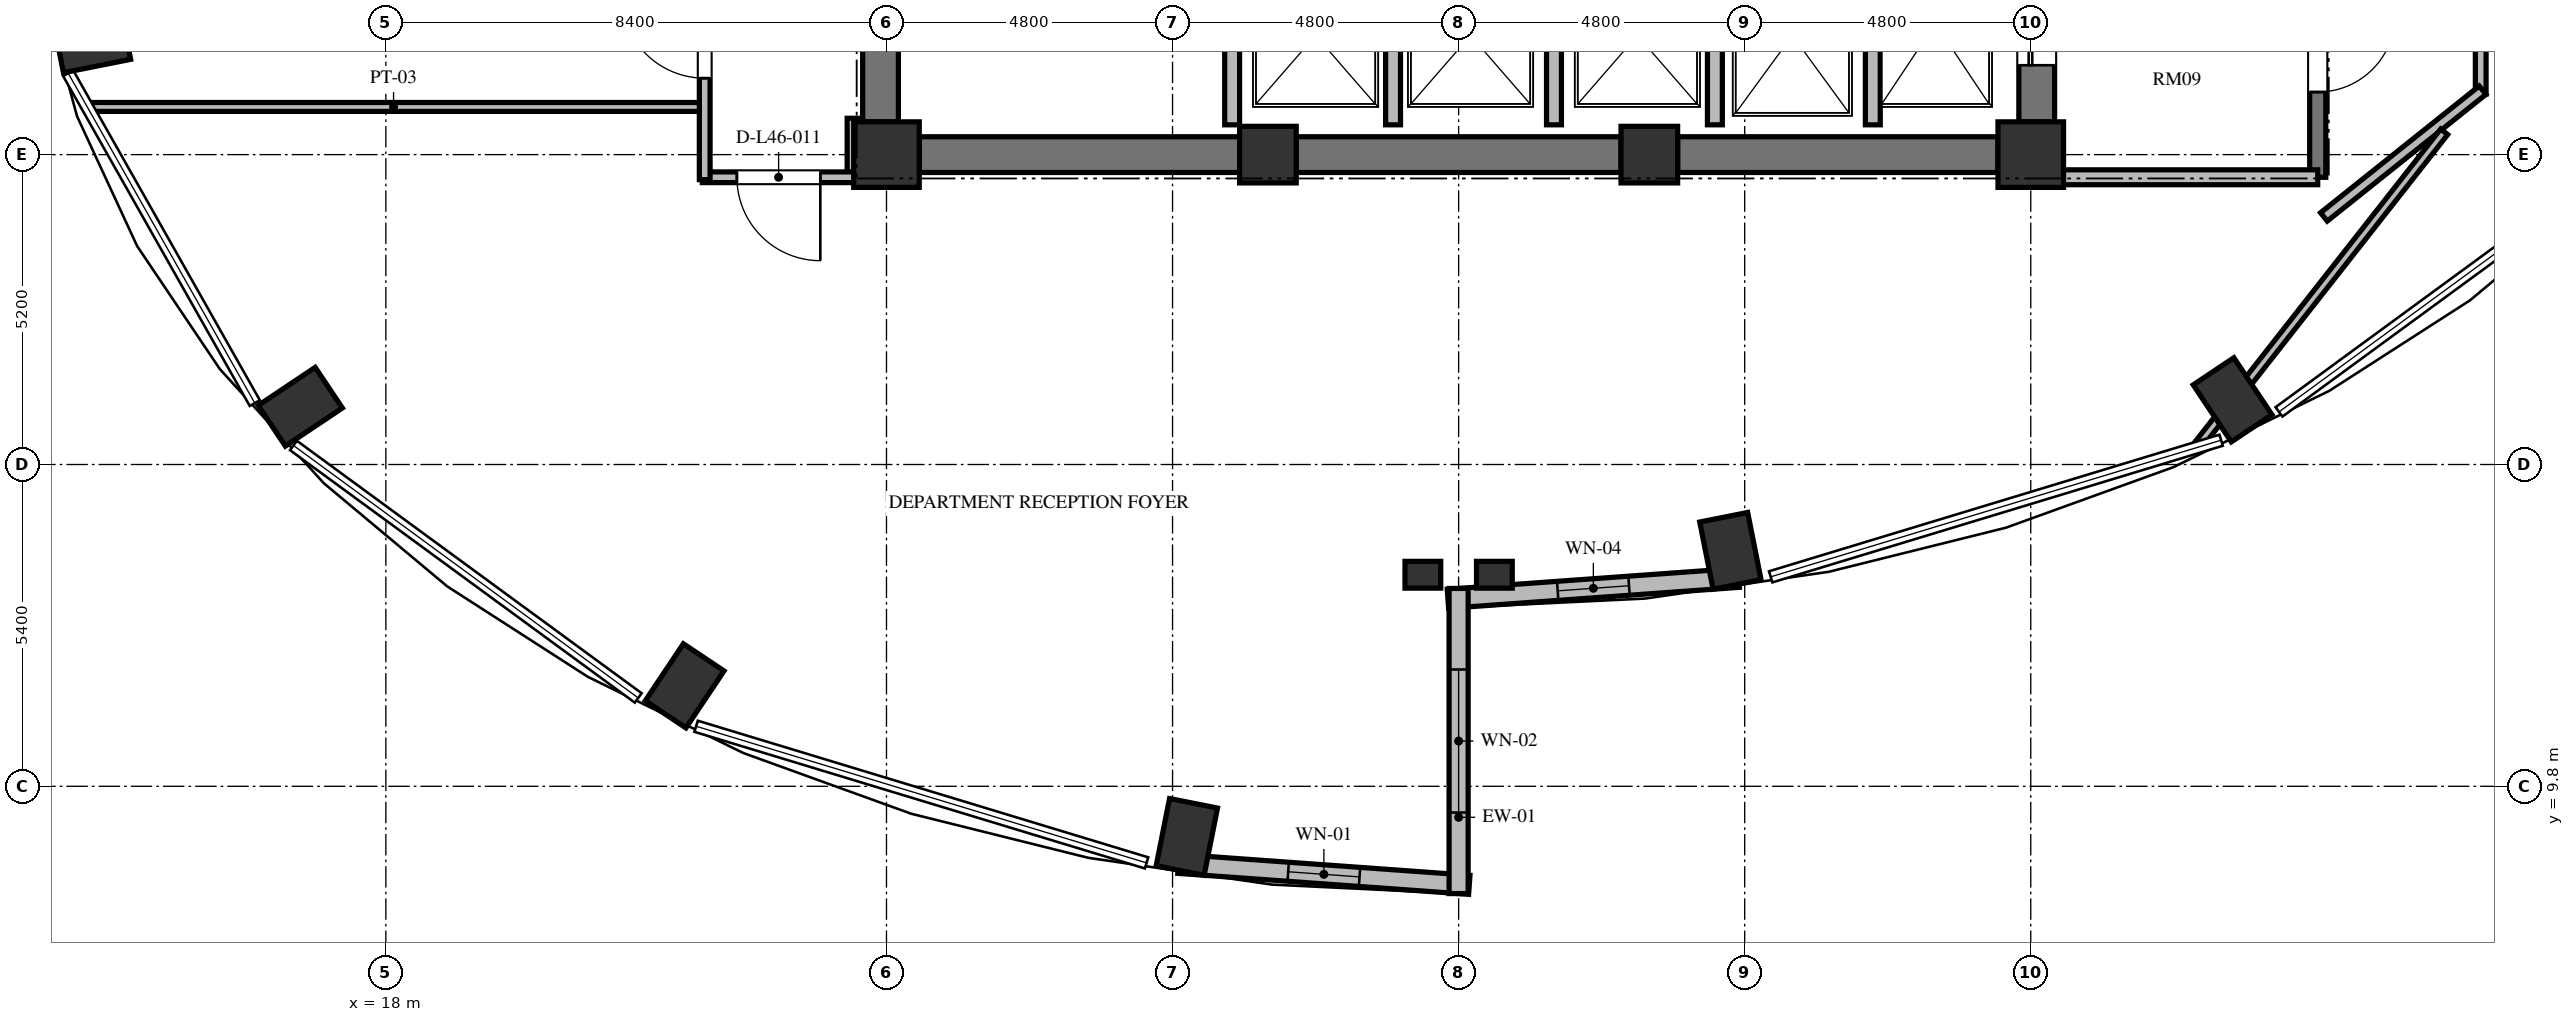
"""IFC4 building model, lengths in metres.
Left out: names, types, materials, properties, quantities, classifications, styles, units other than length and angle.
Written with IfcOpenShell. Run it as: python <this file> out.ifc"""

import sys

from ifc_helpers import new_model, si_unit, direction, frame, frame_2d, origin, origin_2d, place, context, subcontext, project, spatial, rectangle, extrude, element, fill, save


model = new_model("IFC4")
c1 = context("Model", 3, precision=1e-05, world=origin(), true_north=direction((0.0, 1.0)))
c2 = subcontext(c1, "Body", "Model", "MODEL_VIEW")
j1 = project(units=[si_unit("LENGTHUNIT", "METRE"), si_unit("PLANEANGLEUNIT", "RADIAN")], contexts=[c1])
p1 = place(None, origin())
s1 = spatial("IfcSite", under=j1, at=p1, CompositionType="ELEMENT")
p2 = place(p1, origin())
s2 = spatial("IfcBuilding", under=s1, at=p2, CompositionType="ELEMENT")
p3 = place(p2, frame((0.0, 0.0, 178.416)))
s3 = spatial("IfcBuildingStorey", under=s2, at=p3, CompositionType="ELEMENT", Elevation=178.416)
for number, where, z_axis, x_axis in (
    (1, (40.56, 13.751, 0.0), (0.0, 0.0, 1.0), (0.195, -0.981, 0.0)),
    (2, (48.987, 16.286, 0.0), (0.0, 0.0, 1.0), (0.556, -0.831, 0.0)),
    (3, (13.074, 22.288, 0.0), (0.0, 0.0, 1.0), (-0.981, -0.195, 0.0)),
    (4, (16.564, 16.169, 0.0), (0.0, 0.0, 1.0), (-0.831, -0.556, 0.0)),
    (5, (23.013, 11.486, 0.0), (0.0, 0.0, 1.0), (-0.556, -0.831, 0.0)),
    (6, (31.44, 8.951, 0.0), (0.0, 0.0, 1.0), (-0.195, -0.981, 0.0)),
):
    element("IfcColumn", number, at=place(p3, frame(where, z_axis=z_axis, x_axis=x_axis)), inside=s3, PredefinedType="COLUMN", context=c2, shape_type="SweptSolid", body=[
        extrude(rectangle(XDim=1.15, YDim=0.82, at=origin_2d()), origin(), (0.0, 0.0, 1.0), 3.648),
    ])
p4 = place(p3, frame((26.4, 20.4, 0.0), z_axis=(0.0, 0.0, 1.0), x_axis=(1.0, 0.0, 0.0)))
e7 = element("IfcColumn", 7, at=p4, inside=s3, PredefinedType="COLUMN", context=c2, shape_type="SweptSolid", body=[
    extrude(rectangle(XDim=1.1, YDim=1.1, at=origin_2d()), origin(), (0.0, 0.0, 1.0), 3.648),
])
for number, where, z_axis, x_axis in (
    (8, (32.8, 20.4, 0.0), (0.0, 0.0, 1.0), (1.0, 0.0, 0.0)),
    (9, (39.2, 20.4, 0.0), (0.0, 0.0, 1.0), (1.0, 0.0, 0.0)),
):
    element("IfcColumn", number, at=place(p3, frame(where, z_axis=z_axis, x_axis=x_axis)), inside=s3, PredefinedType="COLUMN", context=c2, shape_type="SweptSolid", body=[
        extrude(rectangle(XDim=0.95, YDim=0.95, at=origin_2d()), origin(), (0.0, 0.0, 1.0), 3.648),
    ])
p5 = place(p3, frame((45.6, 20.4, 0.0), z_axis=(0.0, 0.0, 1.0), x_axis=(1.0, 0.0, 0.0)))
e10 = element("IfcColumn", 10, at=p5, inside=s3, PredefinedType="COLUMN", context=c2, shape_type="SweptSolid", body=[
    extrude(rectangle(XDim=1.1, YDim=1.1, at=origin_2d()), origin(), (0.0, 0.0, 1.0), 3.648),
])
for number, where, z_axis, x_axis in (
    (11, (35.4, 13.35, 0.0), (0.0, 0.0, 1.0), (1.0, 0.0, 0.0)),
    (12, (36.6, 13.35, 0.0), (0.0, 0.0, 1.0), (1.0, 0.0, 0.0)),
):
    element("IfcColumn", number, at=place(p3, frame(where, z_axis=z_axis, x_axis=x_axis)), inside=s3, PredefinedType="PILASTER", context=c2, shape_type="SweptSolid", body=[
        extrude(rectangle(XDim=0.6, YDim=0.45, at=origin_2d()), origin(), (0.0, 0.0, 1.0), 3.648),
    ])
p6 = place(p3, frame((26.3, 20.95, 0.0), z_axis=(0.0, 0.0, 1.0), x_axis=(0.0, 1.0, 0.0)))
e13 = element("IfcWall", 13, at=p6, inside=s3, PredefinedType="SHEAR", context=c2, shape_type="SweptSolid", body=[
    extrude(rectangle(XDim=14.1, YDim=0.6, at=frame_2d((7.05, 0.0))), origin(), (0.0, 0.0, 1.0), 3.648),
])
p7 = place(p6, frame((6.5, 0.0, 0.0)))
e14 = element("IfcOpeningElement", 14, at=p7, cuts=e13, PredefinedType="OPENING", context=c2, shape_type="SweptSolid", body=[
    extrude(rectangle(XDim=1.2, YDim=2.15, at=frame_2d((0.6, 1.075))), frame((0.0, 0.31, 0.0), z_axis=(0.0, -1.0, 0.0), x_axis=(1.0, 0.0, 0.0)), (0.0, 0.0, 1.0), 0.62),
])
p8 = place(p6, frame((9.6, 0.0, 0.0)))
e15 = element("IfcOpeningElement", 15, at=p8, cuts=e13, PredefinedType="OPENING", context=c2, shape_type="SweptSolid", body=[
    extrude(rectangle(XDim=1.3, YDim=2.2, at=frame_2d((0.65, 1.1))), frame((0.0, 0.31, 0.0), z_axis=(0.0, -1.0, 0.0), x_axis=(1.0, 0.0, 0.0)), (0.0, 0.0, 1.0), 0.62),
])
p9 = place(p6, frame((3.26, 0.0, 0.0)))
e16 = element("IfcOpeningElement", 16, at=p9, cuts=e13, PredefinedType="OPENING", context=c2, shape_type="SweptSolid", body=[
    extrude(rectangle(XDim=1.3, YDim=2.2, at=frame_2d((0.65, 1.1))), frame((0.0, 0.31, 0.0), z_axis=(0.0, -1.0, 0.0), x_axis=(1.0, 0.0, 0.0)), (0.0, 0.0, 1.0), 0.62),
])
p10 = place(p3, frame((45.7, 20.95, 0.0), z_axis=(0.0, 0.0, 1.0), x_axis=(0.0, 1.0, 0.0)))
e17 = element("IfcWall", 17, at=p10, inside=s3, PredefinedType="SHEAR", context=c2, shape_type="SweptSolid", body=[
    extrude(rectangle(XDim=14.1, YDim=0.6, at=frame_2d((7.05, 0.0))), origin(), (0.0, 0.0, 1.0), 3.648),
])
p11 = place(p10, frame((11.75, 0.0, 0.0)))
e18 = element("IfcOpeningElement", 18, at=p11, cuts=e17, PredefinedType="OPENING", context=c2, shape_type="SweptSolid", body=[
    extrude(rectangle(XDim=1.4, YDim=2.3, at=frame_2d((0.7, 1.15))), frame((0.0, 0.31, 0.0), z_axis=(0.0, -1.0, 0.0), x_axis=(1.0, 0.0, 0.0)), (0.0, 0.0, 1.0), 0.62),
])
p12 = place(p10, frame((0.95, 0.0, 0.0)))
e19 = element("IfcOpeningElement", 19, at=p12, cuts=e17, PredefinedType="OPENING", context=c2, shape_type="SweptSolid", body=[
    extrude(rectangle(XDim=1.4, YDim=2.3, at=frame_2d((0.7, 1.15))), frame((0.0, 0.31, 0.0), z_axis=(0.0, -1.0, 0.0), x_axis=(1.0, 0.0, 0.0)), (0.0, 0.0, 1.0), 0.62),
])
p13 = place(p3, frame((26.95, 20.4, 0.0), z_axis=(0.0, 0.0, 1.0), x_axis=(1.0, 0.0, 0.0)))
e20 = element("IfcWall", 20, at=p13, inside=s3, PredefinedType="SHEAR", context=c2, shape_type="SweptSolid", body=[
    extrude(rectangle(XDim=5.375, YDim=0.6, at=frame_2d((2.688, 0.0))), origin(), (0.0, 0.0, 1.0), 3.648),
])
p14 = place(p3, frame((33.275, 20.4, 0.0), z_axis=(0.0, 0.0, 1.0), x_axis=(1.0, 0.0, 0.0)))
e21 = element("IfcWall", 21, at=p14, inside=s3, PredefinedType="SHEAR", context=c2, shape_type="SweptSolid", body=[
    extrude(rectangle(XDim=5.45, YDim=0.6, at=frame_2d((2.725, 0.0))), origin(), (0.0, 0.0, 1.0), 3.648),
])
p15 = place(p3, frame((39.675, 20.4, 0.0), z_axis=(0.0, 0.0, 1.0), x_axis=(1.0, 0.0, 0.0)))
e22 = element("IfcWall", 22, at=p15, inside=s3, PredefinedType="SHEAR", context=c2, shape_type="SweptSolid", body=[
    extrude(rectangle(XDim=5.375, YDim=0.6, at=frame_2d((2.688, 0.0))), origin(), (0.0, 0.0, 1.0), 3.648),
])
p16 = place(p3, frame((35.821, 12.947, 0.0), z_axis=(0.0, 0.0, 1.0), x_axis=(0.997415460462, 0.071849838072, 0.0)))
e23 = element("IfcWall", 23, at=p16, inside=s3, PredefinedType="SOLIDWALL", context=c2, shape_type="SweptSolid", body=[
    extrude(rectangle(XDim=4.893, YDim=0.32, at=frame_2d((2.447, 0.0))), origin(), (0.0, 0.0, 1.0), 3.428),
])
p17 = place(p16, frame((1.846, 0.0, 0.85)))
e24 = element("IfcOpeningElement", 24, at=p17, cuts=e23, PredefinedType="OPENING", context=c2, shape_type="SweptSolid", body=[
    extrude(rectangle(XDim=1.2, YDim=1.8, at=frame_2d((0.6, 0.9))), frame((0.0, 0.17, 0.0), z_axis=(0.0, -1.0, 0.0), x_axis=(1.0, 0.0, 0.0)), (0.0, 0.0, 1.0), 0.34),
])
p18 = place(p3, frame((31.299, 8.499, 0.0), z_axis=(0.0, 0.0, 1.0), x_axis=(0.997415202861, -0.071853413984, 0.0)))
e25 = element("IfcWall", 25, at=p18, inside=s3, PredefinedType="SOLIDWALL", context=c2, shape_type="SweptSolid", body=[
    extrude(rectangle(XDim=4.893, YDim=0.32, at=frame_2d((2.446, 0.0))), origin(), (0.0, 0.0, 1.0), 3.428),
])
p19 = place(p18, frame((1.846, 0.0, 0.85)))
e26 = element("IfcOpeningElement", 26, at=p19, cuts=e25, PredefinedType="OPENING", context=c2, shape_type="SweptSolid", body=[
    extrude(rectangle(XDim=1.2, YDim=2.2, at=frame_2d((0.6, 1.1))), frame((0.0, 0.17, 0.0), z_axis=(0.0, -1.0, 0.0), x_axis=(1.0, 0.0, 0.0)), (0.0, 0.0, 1.0), 0.34),
])
p20 = place(p3, frame((36.0, 8.0, 0.0), z_axis=(0.0, 0.0, 1.0), x_axis=(0.0, 1.0, 0.0)))
e27 = element("IfcWall", 27, at=p20, inside=s3, PredefinedType="SOLIDWALL", context=c2, shape_type="SweptSolid", body=[
    extrude(rectangle(XDim=5.12, YDim=0.32, at=frame_2d((2.56, 0.0))), origin(), (0.0, 0.0, 1.0), 3.428),
])
p21 = place(p20, frame((1.36, 0.0, 0.84)))
e28 = element("IfcOpeningElement", 28, at=p21, cuts=e27, PredefinedType="OPENING", context=c2, shape_type="SweptSolid", body=[
    extrude(rectangle(XDim=2.4, YDim=2.04, at=frame_2d((1.2, 1.02))), frame((0.0, 0.17, 0.0), z_axis=(0.0, -1.0, 0.0), x_axis=(1.0, 0.0, 0.0)), (0.0, 0.0, 1.0), 0.34),
])
p22 = place(p3, frame((42.95, 20.9, 0.0), z_axis=(0.0, 0.0, 1.0), x_axis=(0.0, 1.0, 0.0)))
e29 = element("IfcWall", 29, at=p22, inside=s3, PredefinedType="SOLIDWALL", context=c2, shape_type="SweptSolid", body=[
    extrude(rectangle(XDim=3.2, YDim=0.25, at=frame_2d((1.6, 0.0))), origin(), (0.0, 0.0, 1.0), 3.428),
])
for number, where, z_axis, x_axis in (
    (30, (32.2, 20.9, 0.0), (0.0, 0.0, 1.0), (0.0, 1.0, 0.0)),
    (31, (34.9, 20.9, 0.0), (0.0, 0.0, 1.0), (0.0, 1.0, 0.0)),
    (32, (37.6, 20.9, 0.0), (0.0, 0.0, 1.0), (0.0, 1.0, 0.0)),
    (33, (40.3, 20.9, 0.0), (0.0, 0.0, 1.0), (0.0, 1.0, 0.0)),
):
    element("IfcWall", number, at=place(p3, frame(where, z_axis=z_axis, x_axis=x_axis)), inside=s3, PredefinedType="SOLIDWALL", context=c2, shape_type="SweptSolid", body=[
        extrude(rectangle(XDim=2.8, YDim=0.25, at=frame_2d((1.4, 0.0))), origin(), (0.0, 0.0, 1.0), 3.428),
    ])
p23 = place(p3, frame((50.415, 35.845, 0.0), z_axis=(0.0, 0.0, 1.0), x_axis=(0.0, -1.0, 0.0)))
e34 = element("IfcWall", 34, at=p23, inside=s3, PredefinedType="SHEAR", context=c2, shape_type="SweptSolid", body=[
    extrude(rectangle(XDim=15.825, YDim=0.27, at=frame_2d((7.913, 0.0))), origin(), (0.0, 0.0, 1.0), 3.648),
])
p24 = place(p23, frame((4.445, 0.0, 0.0)))
e35 = element("IfcOpeningElement", 35, at=p24, cuts=e34, PredefinedType="OPENING", context=c2, shape_type="SweptSolid", body=[
    extrude(rectangle(XDim=1.2, YDim=2.15, at=frame_2d((0.6, 1.075))), frame((0.0, 0.145, 0.0), z_axis=(0.0, -1.0, 0.0), x_axis=(1.0, 0.0, 0.0)), (0.0, 0.0, 1.0), 0.29),
])
p25 = place(p23, frame((1.295, 0.0, 0.0)))
e36 = element("IfcOpeningElement", 36, at=p25, cuts=e34, PredefinedType="OPENING", context=c2, shape_type="SweptSolid", body=[
    extrude(rectangle(XDim=1.3, YDim=2.2, at=frame_2d((0.65, 1.1))), frame((0.0, 0.145, 0.0), z_axis=(0.0, -1.0, 0.0), x_axis=(1.0, 0.0, 0.0)), (0.0, 0.0, 1.0), 0.29),
])
p26 = place(p23, frame((13.095, 0.0, 0.0)))
e37 = element("IfcOpeningElement", 37, at=p26, cuts=e34, PredefinedType="OPENING", context=c2, shape_type="SweptSolid", body=[
    extrude(rectangle(XDim=1.3, YDim=2.2, at=frame_2d((0.65, 1.1))), frame((0.0, 0.145, 0.0), z_axis=(0.0, -1.0, 0.0), x_axis=(1.0, 0.0, 0.0)), (0.0, 0.0, 1.0), 0.29),
])
p27 = place(p3, frame((45.7, 20.02, 0.0), z_axis=(0.0, 0.0, 1.0), x_axis=(1.0, 0.0, 0.0)))
e38 = element("IfcWall", 38, at=p27, inside=s3, PredefinedType="SOLIDWALL", context=c2, shape_type="SweptSolid", body=[
    extrude(rectangle(XDim=4.715, YDim=0.25, at=frame_2d((2.357, 0.0))), origin(), (0.0, 0.0, 1.0), 3.428),
])
p28 = place(p3, frame((53.15, 38.79, 0.0), z_axis=(0.0, 0.0, 1.0), x_axis=(0.0, -1.0, 0.0)))
e39 = element("IfcWall", 39, at=p28, inside=s3, PredefinedType="PARTITIONING", context=c2, shape_type="SweptSolid", body=[
    extrude(rectangle(XDim=17.374, YDim=0.18, at=frame_2d((8.687, 0.0))), origin(), (0.0, 0.0, 1.0), 3.428),
])
p29 = place(p28, frame((8.162, 0.0, 0.0)))
e40 = element("IfcOpeningElement", 40, at=p29, cuts=e39, PredefinedType="OPENING", context=c2, shape_type="SweptSolid", body=[
    extrude(rectangle(XDim=1.05, YDim=2.15, at=frame_2d((0.525, 1.075))), frame((0.0, 0.1, 0.0), z_axis=(0.0, -1.0, 0.0), x_axis=(1.0, 0.0, 0.0)), (0.0, 0.0, 1.0), 0.2),
])
p30 = place(p3, frame((53.181, 21.481, 0.0), z_axis=(0.0, 0.0, 1.0), x_axis=(-0.781420737726, -0.624004511724, 0.0)))
e41 = element("IfcWall", 41, at=p30, inside=s3, PredefinedType="PARTITIONING", context=c2, shape_type="SweptSolid", body=[
    extrude(rectangle(XDim=3.407, YDim=0.18, at=frame_2d((1.704, 0.0))), origin(), (0.0, 0.0, 1.0), 3.428),
])
p31 = place(p3, frame((25.83, 21.01, 0.0), z_axis=(0.0, 0.0, 1.0), x_axis=(0.0, -1.0, 0.0)))
e42 = element("IfcWall", 42, at=p31, inside=s3, PredefinedType="PARTITIONING", context=c2, shape_type="SweptSolid", body=[
    extrude(rectangle(XDim=1.03, YDim=0.18, at=frame_2d((0.515, 0.0))), origin(), (0.0, 0.0, 1.0), 3.428),
])
p32 = place(p3, frame((25.87, 20.02, 0.0), z_axis=(0.0, 0.0, 1.0), x_axis=(-1.0, 0.0, 0.0)))
e43 = element("IfcWall", 43, at=p32, inside=s3, PredefinedType="PARTITIONING", context=c2, shape_type="SweptSolid", body=[
    extrude(rectangle(XDim=2.56, YDim=0.18, at=frame_2d((1.28, 0.0))), origin(), (0.0, 0.0, 1.0), 3.428),
])
p33 = place(p32, frame((0.58, 0.0, 0.0)))
e44 = element("IfcOpeningElement", 44, at=p33, cuts=e43, PredefinedType="OPENING", context=c2, shape_type="SweptSolid", body=[
    extrude(rectangle(XDim=1.4, YDim=2.2, at=frame_2d((0.7, 1.1))), frame((0.0, 0.1, 0.0), z_axis=(0.0, -1.0, 0.0), x_axis=(1.0, 0.0, 0.0)), (0.0, 0.0, 1.0), 0.2),
])
p34 = place(p3, frame((23.35, 19.98, 0.0), z_axis=(0.0, 0.0, 1.0), x_axis=(0.0, 1.0, 0.0)))
e45 = element("IfcWall", 45, at=p34, inside=s3, PredefinedType="PARTITIONING", context=c2, shape_type="SweptSolid", body=[
    extrude(rectangle(XDim=5.06, YDim=0.18, at=frame_2d((2.53, 0.0))), origin(), (0.0, 0.0, 1.0), 3.428),
])
p35 = place(p34, frame((1.702, 0.0, 0.0)))
e46 = element("IfcOpeningElement", 46, at=p35, cuts=e45, PredefinedType="OPENING", context=c2, shape_type="SweptSolid", body=[
    extrude(rectangle(XDim=1.4, YDim=2.2, at=frame_2d((0.7, 1.1))), frame((0.0, 0.1, 0.0), z_axis=(0.0, -1.0, 0.0), x_axis=(1.0, 0.0, 0.0)), (0.0, 0.0, 1.0), 0.2),
])
p36 = place(p3, frame((12.999, 21.2, 0.0), z_axis=(0.0, 0.0, 1.0), x_axis=(1.0, 0.0, 0.0)))
e47 = element("IfcWall", 47, at=p36, inside=s3, PredefinedType="PARTITIONING", context=c2, shape_type="SweptSolid", body=[
    extrude(rectangle(XDim=10.261, YDim=0.15, at=frame_2d((5.131, 0.0))), origin(), (0.0, 0.0, 1.0), 2.863),
])
p37 = place(p3, frame((52.537, 20.783, 0.0), z_axis=(0.0, 0.0, 1.0), x_axis=(-0.617570357244, -0.786515641201, 0.0)))
e48 = element("IfcWall", 48, at=p37, inside=s3, PredefinedType="PARTITIONING", context=c2, shape_type="SweptSolid", body=[
    extrude(rectangle(XDim=6.74, YDim=0.15, at=frame_2d((3.37, 0.0))), origin(), (0.0, 0.0, 1.0), 2.863),
])
p38 = place(p17, origin())
e49 = element("IfcWindow", 49, at=p38, inside=s3, PartitioningType="SINGLE_PANEL", PredefinedType="WINDOW", context=c2, shape_type="SweptSolid", body=[
    extrude(rectangle(XDim=1.2, YDim=1.8, at=frame_2d((0.6, 0.9))), frame((0.0, 0.03, 0.0), z_axis=(0.0, -1.0, 0.0), x_axis=(1.0, 0.0, 0.0)), (0.0, 0.0, 1.0), 0.06),
])
fill(e24, e49)
p39 = place(p19, origin())
e50 = element("IfcWindow", 50, at=p39, inside=s3, PartitioningType="SINGLE_PANEL", PredefinedType="WINDOW", context=c2, shape_type="SweptSolid", body=[
    extrude(rectangle(XDim=1.2, YDim=2.2, at=frame_2d((0.6, 1.1))), frame((0.0, 0.03, 0.0), z_axis=(0.0, -1.0, 0.0), x_axis=(1.0, 0.0, 0.0)), (0.0, 0.0, 1.0), 0.06),
])
fill(e26, e50)
p40 = place(p21, origin())
e51 = element("IfcWindow", 51, at=p40, inside=s3, PartitioningType="SINGLE_PANEL", PredefinedType="WINDOW", context=c2, shape_type="SweptSolid", body=[
    extrude(rectangle(XDim=2.4, YDim=2.04, at=frame_2d((1.2, 1.02))), frame((0.0, 0.03, 0.0), z_axis=(0.0, -1.0, 0.0), x_axis=(1.0, 0.0, 0.0)), (0.0, 0.0, 1.0), 0.06),
])
fill(e28, e51)
p41 = place(p12, origin())
e52 = element("IfcDoor", 52, at=p41, inside=s3, OperationType="SLIDING_TO_LEFT", PredefinedType="DOOR", context=c2, shape_type="SweptSolid", body=[
    extrude(rectangle(XDim=1.4, YDim=2.3, at=frame_2d((0.7, 1.15))), frame((0.0, 0.025, 0.0), z_axis=(0.0, -1.0, 0.0), x_axis=(1.0, 0.0, 0.0)), (0.0, 0.0, 1.0), 0.05),
])
fill(e19, e52)
p42 = place(p26, origin())
e53 = element("IfcDoor", 53, at=p42, inside=s3, OperationType="SINGLE_SWING_LEFT", PredefinedType="DOOR", context=c2, shape_type="SweptSolid", body=[
    extrude(rectangle(XDim=1.3, YDim=2.2, at=frame_2d((0.65, 1.1))), frame((0.0, 0.025, 0.0), z_axis=(0.0, -1.0, 0.0), x_axis=(1.0, 0.0, 0.0)), (0.0, 0.0, 1.0), 0.05),
])
fill(e37, e53)
p43 = place(p35, origin())
e54 = element("IfcDoor", 54, at=p43, inside=s3, OperationType="SINGLE_SWING_RIGHT", PredefinedType="DOOR", context=c2, shape_type="SweptSolid", body=[
    extrude(rectangle(XDim=1.4, YDim=2.2, at=frame_2d((0.7, 1.1))), frame((0.0, 0.025, 0.0), z_axis=(0.0, -1.0, 0.0), x_axis=(1.0, 0.0, 0.0)), (0.0, 0.0, 1.0), 0.05),
])
fill(e46, e54)
p44 = place(p33, origin())
e55 = element("IfcDoor", 55, at=p44, inside=s3, OperationType="SINGLE_SWING_LEFT", PredefinedType="DOOR", context=c2, shape_type="SweptSolid", body=[
    extrude(rectangle(XDim=1.4, YDim=2.2, at=frame_2d((0.7, 1.1))), frame((0.0, 0.025, 0.0), z_axis=(0.0, -1.0, 0.0), x_axis=(1.0, 0.0, 0.0)), (0.0, 0.0, 1.0), 0.05),
])
fill(e44, e55)
save(model, sys.argv[1])
